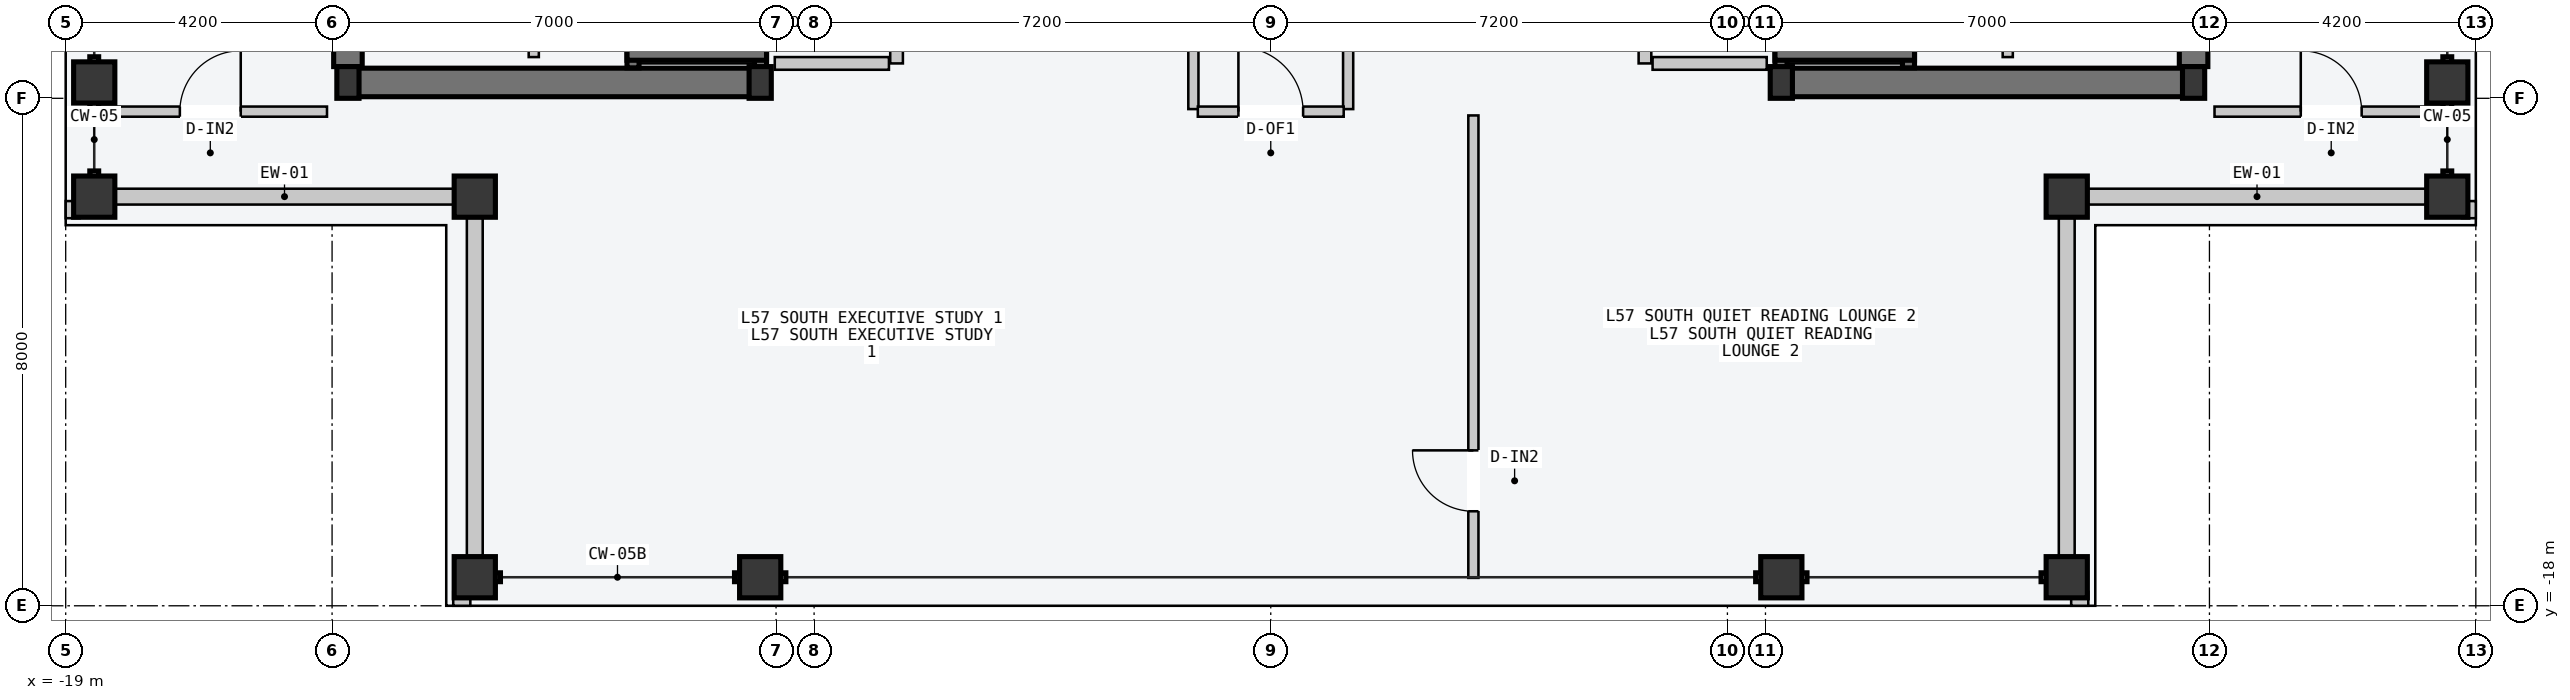
"""IFC4 building model, lengths in metres.
Left out: names, types, materials, properties, quantities, classifications, styles, units other than length and angle.
Written with IfcOpenShell. Run it as: python <this file> out.ifc"""

import sys

from ifc_helpers import new_model, si_unit, direction, frame, frame_2d, origin, origin_2d, place, context, subcontext, project, spatial, rectangle, hollow_rectangle, i_section, extrude, element, fill, save


model = new_model("IFC4")
c1 = context("Model", 3, precision=1e-05, world=origin(), true_north=direction((0.0, 1.0)))
c2 = subcontext(c1, "Body", "Model", "MODEL_VIEW")
j1 = project(units=[si_unit("LENGTHUNIT", "METRE"), si_unit("PLANEANGLEUNIT", "RADIAN")], contexts=[c1])
p1 = place(None, origin())
s1 = spatial("IfcSite", under=j1, at=p1, CompositionType="ELEMENT")
p2 = place(p1, origin())
s2 = spatial("IfcBuilding", under=s1, at=p2, CompositionType="ELEMENT")
p3 = place(p2, frame((0.0, 0.0, 218.4)))
s3 = spatial("IfcBuildingStorey", under=s2, at=p3, CompositionType="ELEMENT", Elevation=218.4)
p4 = place(p3, frame((-14.53, -9.75, -0.2), z_axis=(0.0, 0.0, 1.0), x_axis=(1.0, 0.0, 0.0)))
e1 = element("IfcWall", 1, at=p4, inside=s3, PredefinedType="SHEAR", context=c2, shape_type="SweptSolid", body=[
    extrude(rectangle(XDim=6.46, YDim=0.45, at=frame_2d((3.23, 0.0))), origin(), (0.0, 0.0, 1.0), 3.6),
])
p5 = place(p3, frame((-14.55, -9.5, -0.2), z_axis=(0.0, 0.0, 1.0), x_axis=(0.0, 1.0, 0.0)))
e2 = element("IfcWall", 2, at=p5, inside=s3, PredefinedType="SHEAR", context=c2, shape_type="SweptSolid", body=[
    extrude(rectangle(XDim=9.25, YDim=0.45, at=frame_2d((4.625, 0.0))), origin(), (0.0, 0.0, 1.0), 3.6),
])
p6 = place(p3, frame((8.07, -9.75, -0.2), z_axis=(0.0, 0.0, 1.0), x_axis=(1.0, 0.0, 0.0)))
e3 = element("IfcWall", 3, at=p6, inside=s3, PredefinedType="SHEAR", context=c2, shape_type="SweptSolid", body=[
    extrude(rectangle(XDim=6.46, YDim=0.45, at=frame_2d((3.23, 0.0))), origin(), (0.0, 0.0, 1.0), 3.6),
])
p7 = place(p3, frame((14.55, -9.5, -0.2), z_axis=(0.0, 0.0, 1.0), x_axis=(0.0, 1.0, 0.0)))
e4 = element("IfcWall", 4, at=p7, inside=s3, PredefinedType="SHEAR", context=c2, shape_type="SweptSolid", body=[
    extrude(rectangle(XDim=9.25, YDim=0.45, at=frame_2d((4.625, 0.0))), origin(), (0.0, 0.0, 1.0), 3.6),
])
for number, where, z_axis, x_axis in (
    (5, (-14.55, -9.75, 0.0), (0.0, 0.0, 1.0), (1.0, 0.0, 0.0)),
    (6, (-8.05, -9.75, 0.0), (0.0, 0.0, 1.0), (1.0, 0.0, 0.0)),
    (7, (8.05, -9.75, 0.0), (0.0, 0.0, 1.0), (1.0, 0.0, 0.0)),
    (8, (14.55, -9.75, 0.0), (0.0, 0.0, 1.0), (1.0, 0.0, 0.0)),
):
    element("IfcColumn", number, at=place(p3, frame(where, z_axis=z_axis, x_axis=x_axis)), inside=s3, PredefinedType="COLUMN", context=c2, shape_type="SweptSolid", body=[
        extrude(i_section(OverallWidth=0.35, OverallDepth=0.5, WebThickness=0.02, FlangeThickness=0.032, at=origin_2d()), origin(), (0.0, 0.0, 1.0), 3.6),
    ])
for number, where, z_axis, x_axis in (
    (9, (-12.55, -17.55, 0.0), (0.0, 0.0, 1.0), (1.0, 0.0, 0.0)),
    (10, (-8.05, -17.55, 0.0), (0.0, 0.0, 1.0), (1.0, 0.0, 0.0)),
    (11, (8.05, -17.55, 0.0), (0.0, 0.0, 1.0), (1.0, 0.0, 0.0)),
    (12, (12.55, -17.55, 0.0), (0.0, 0.0, 1.0), (1.0, 0.0, 0.0)),
    (13, (-18.55, -11.55, 0.0), (0.0, 0.0, 1.0), (0.0, 1.0, 0.0)),
    (14, (-18.55, -9.75, 0.0), (0.0, 0.0, 1.0), (0.0, 1.0, 0.0)),
    (15, (18.55, -11.55, 0.0), (0.0, 0.0, 1.0), (0.0, 1.0, 0.0)),
    (16, (18.55, -9.75, 0.0), (0.0, 0.0, 1.0), (0.0, 1.0, 0.0)),
    (17, (12.55, -11.55, 0.0), (0.0, 0.0, 1.0), (1.0, 0.0, 0.0)),
    (18, (-12.55, -11.55, 0.0), (0.0, 0.0, 1.0), (1.0, 0.0, 0.0)),
):
    element("IfcColumn", number, at=place(p3, frame(where, z_axis=z_axis, x_axis=x_axis)), inside=s3, PredefinedType="COLUMN", context=c2, shape_type="SweptSolid", body=[
        extrude(hollow_rectangle(XDim=0.65, YDim=0.65, WallThickness=0.028, at=origin_2d()), origin(), (0.0, 0.0, 1.0), 3.6),
    ])
for number, where, z_axis, x_axis in (
    (19, (-18.215, -11.55, 0.0), (0.0, 0.0, 1.0), (1.0, 0.0, 0.0)),
    (20, (-12.55, -17.215, 0.0), (0.0, 0.0, 1.0), (0.0, 1.0, 0.0)),
    (21, (12.885, -11.55, 0.0), (0.0, 0.0, 1.0), (1.0, 0.0, 0.0)),
    (22, (12.55, -17.215, 0.0), (0.0, 0.0, 1.0), (0.0, 1.0, 0.0)),
):
    element("IfcWall", number, at=place(p3, frame(where, z_axis=z_axis, x_axis=x_axis)), inside=s3, PredefinedType="STANDARD", context=c2, shape_type="SweptSolid", body=[
        extrude(rectangle(XDim=5.33, YDim=0.25, at=frame_2d((2.665, 0.0))), origin(), (0.0, 0.0, 1.0), 2.85),
    ])
for number, where, z_axis, x_axis in (
    (23, (-12.89, -17.89, 0.0), (0.0, 0.0, 1.0), (1.0, 0.0, 0.0)),
    (24, (-18.89, -11.89, 0.0), (0.0, 0.0, 1.0), (0.0, 1.0, 0.0)),
    (25, (12.62, -17.89, 0.0), (0.0, 0.0, 1.0), (1.0, 0.0, 0.0)),
    (26, (18.89, -11.89, 0.0), (0.0, 0.0, 1.0), (0.0, 1.0, 0.0)),
):
    element("IfcWall", number, at=place(p3, frame(where, z_axis=z_axis, x_axis=x_axis)), inside=s3, PredefinedType="PARAPET", context=c2, shape_type="SweptSolid", body=[
        extrude(rectangle(XDim=0.27, YDim=0.22, at=frame_2d((0.135, 0.0))), origin(), (0.0, 0.0, 1.0), 1.2),
    ])
p8 = place(p3, frame((-8.045, -9.52, -0.2), z_axis=(0.0, 0.0, 1.0), x_axis=(0.0, 1.0, 0.0)))
e27 = element("IfcWall", 27, at=p8, inside=s3, PredefinedType="SOLIDWALL", context=c2, shape_type="SweptSolid", body=[
    extrude(rectangle(XDim=2.12, YDim=0.19, at=frame_2d((1.06, 0.0))), origin(), (0.0, 0.0, 1.0), 3.6),
])
p9 = place(p8, frame((0.57, 0.0, 0.2)))
e28 = element("IfcOpeningElement", 28, at=p9, cuts=e27, PredefinedType="OPENING", context=c2, shape_type="SweptSolid", body=[
    extrude(rectangle(XDim=1.1, YDim=2.2, at=frame_2d((0.55, 1.1))), frame((0.0, 0.105, 0.0), z_axis=(0.0, -1.0, 0.0), x_axis=(1.0, 0.0, 0.0)), (0.0, 0.0, 1.0), 0.21),
])
p10 = place(p3, frame((-10.055, -9.52, -0.2), z_axis=(0.0, 0.0, 1.0), x_axis=(0.0, 1.0, 0.0)))
e29 = element("IfcWall", 29, at=p10, inside=s3, PredefinedType="SOLIDWALL", context=c2, shape_type="SweptSolid", body=[
    extrude(rectangle(XDim=2.12, YDim=0.19, at=frame_2d((1.06, 0.0))), origin(), (0.0, 0.0, 1.0), 3.6),
])
p11 = place(p3, frame((-10.15, -9.305, -0.2), z_axis=(0.0, 0.0, 1.0), x_axis=(1.0, 0.0, 0.0)))
e30 = element("IfcWall", 30, at=p11, inside=s3, PredefinedType="SOLIDWALL", context=c2, shape_type="SweptSolid", body=[
    extrude(rectangle(XDim=2.2, YDim=0.19, at=frame_2d((1.1, 0.0))), origin(), (0.0, 0.0, 1.0), 3.6),
])
p12 = place(p3, frame((8.045, -9.52, -0.2), z_axis=(0.0, 0.0, 1.0), x_axis=(0.0, 1.0, 0.0)))
e31 = element("IfcWall", 31, at=p12, inside=s3, PredefinedType="SOLIDWALL", context=c2, shape_type="SweptSolid", body=[
    extrude(rectangle(XDim=2.12, YDim=0.19, at=frame_2d((1.06, 0.0))), origin(), (0.0, 0.0, 1.0), 3.6),
])
p13 = place(p12, frame((0.57, 0.0, 0.2)))
e32 = element("IfcOpeningElement", 32, at=p13, cuts=e31, PredefinedType="OPENING", context=c2, shape_type="SweptSolid", body=[
    extrude(rectangle(XDim=1.1, YDim=2.2, at=frame_2d((0.55, 1.1))), frame((0.0, 0.105, 0.0), z_axis=(0.0, -1.0, 0.0), x_axis=(1.0, 0.0, 0.0)), (0.0, 0.0, 1.0), 0.21),
])
p14 = place(p3, frame((10.055, -9.52, -0.2), z_axis=(0.0, 0.0, 1.0), x_axis=(0.0, 1.0, 0.0)))
e33 = element("IfcWall", 33, at=p14, inside=s3, PredefinedType="SOLIDWALL", context=c2, shape_type="SweptSolid", body=[
    extrude(rectangle(XDim=2.12, YDim=0.19, at=frame_2d((1.06, 0.0))), origin(), (0.0, 0.0, 1.0), 3.6),
])
p15 = place(p3, frame((7.95, -9.305, -0.2), z_axis=(0.0, 0.0, 1.0), x_axis=(1.0, 0.0, 0.0)))
e34 = element("IfcWall", 34, at=p15, inside=s3, PredefinedType="SOLIDWALL", context=c2, shape_type="SweptSolid", body=[
    extrude(rectangle(XDim=2.2, YDim=0.19, at=frame_2d((1.1, 0.0))), origin(), (0.0, 0.0, 1.0), 3.6),
])
p16 = place(p3, frame((-5.9, -9.45, 0.0), z_axis=(0.0, 0.0, 1.0), x_axis=(0.0, 1.0, 0.0)))
e35 = element("IfcWall", 35, at=p16, inside=s3, PredefinedType="PARTITIONING", context=c2, shape_type="SweptSolid", body=[
    extrude(rectangle(XDim=10.5, YDim=0.2, at=frame_2d((5.25, 0.0))), origin(), (0.0, 0.0, 1.0), 3.4),
])
p17 = place(p16, frame((3.9, 0.0, 0.0)))
e36 = element("IfcOpeningElement", 36, at=p17, cuts=e35, PredefinedType="OPENING", context=c2, shape_type="SweptSolid", body=[
    extrude(rectangle(XDim=1.5, YDim=2.2, at=frame_2d((0.75, 1.1))), frame((0.0, 0.11, 0.0), z_axis=(0.0, -1.0, 0.0), x_axis=(1.0, 0.0, 0.0)), (0.0, 0.0, 1.0), 0.22),
])
p18 = place(p3, frame((-6.02, -9.45, 0.0), z_axis=(0.0, 0.0, 1.0), x_axis=(-1.0, 0.0, 0.0)))
e37 = element("IfcWall", 37, at=p18, inside=s3, PredefinedType="PARTITIONING", context=c2, shape_type="SweptSolid", body=[
    extrude(rectangle(XDim=1.8, YDim=0.2, at=frame_2d((0.9, 0.0))), origin(), (0.0, 0.0, 1.0), 3.4),
])
p19 = place(p3, frame((-11.62, -9.35, 0.0), z_axis=(0.0, 0.0, 1.0), x_axis=(0.0, 1.0, 0.0)))
e38 = element("IfcWall", 38, at=p19, inside=s3, PredefinedType="PARTITIONING", context=c2, shape_type="SweptSolid", body=[
    extrude(rectangle(XDim=3.85, YDim=0.16, at=frame_2d((1.925, 0.0))), origin(), (0.0, 0.0, 1.0), 3.4),
])
p20 = place(p19, frame((1.475, 0.0, 0.0)))
e39 = element("IfcOpeningElement", 39, at=p20, cuts=e38, PredefinedType="OPENING", context=c2, shape_type="SweptSolid", body=[
    extrude(rectangle(XDim=0.9, YDim=2.15, at=frame_2d((0.45, 1.075))), frame((0.0, 0.09, 0.0), z_axis=(0.0, -1.0, 0.0), x_axis=(1.0, 0.0, 0.0)), (0.0, 0.0, 1.0), 0.18),
])
p21 = place(p3, frame((5.9, -9.45, 0.0), z_axis=(0.0, 0.0, 1.0), x_axis=(0.0, 1.0, 0.0)))
e40 = element("IfcWall", 40, at=p21, inside=s3, PredefinedType="PARTITIONING", context=c2, shape_type="SweptSolid", body=[
    extrude(rectangle(XDim=10.5, YDim=0.2, at=frame_2d((5.25, 0.0))), origin(), (0.0, 0.0, 1.0), 3.4),
])
p22 = place(p21, frame((3.9, 0.0, 0.0)))
e41 = element("IfcOpeningElement", 41, at=p22, cuts=e40, PredefinedType="OPENING", context=c2, shape_type="SweptSolid", body=[
    extrude(rectangle(XDim=1.5, YDim=2.2, at=frame_2d((0.75, 1.1))), frame((0.0, 0.11, 0.0), z_axis=(0.0, -1.0, 0.0), x_axis=(1.0, 0.0, 0.0)), (0.0, 0.0, 1.0), 0.22),
])
p23 = place(p3, frame((6.02, -9.45, 0.0), z_axis=(0.0, 0.0, 1.0), x_axis=(1.0, 0.0, 0.0)))
e42 = element("IfcWall", 42, at=p23, inside=s3, PredefinedType="PARTITIONING", context=c2, shape_type="SweptSolid", body=[
    extrude(rectangle(XDim=1.8, YDim=0.2, at=frame_2d((0.9, 0.0))), origin(), (0.0, 0.0, 1.0), 3.4),
])
p24 = place(p3, frame((11.62, -9.35, 0.0), z_axis=(0.0, 0.0, 1.0), x_axis=(0.0, 1.0, 0.0)))
e43 = element("IfcWall", 43, at=p24, inside=s3, PredefinedType="PARTITIONING", context=c2, shape_type="SweptSolid", body=[
    extrude(rectangle(XDim=3.85, YDim=0.16, at=frame_2d((1.925, 0.0))), origin(), (0.0, 0.0, 1.0), 3.4),
])
p25 = place(p24, frame((1.475, 0.0, 0.0)))
e44 = element("IfcOpeningElement", 44, at=p25, cuts=e43, PredefinedType="OPENING", context=c2, shape_type="SweptSolid", body=[
    extrude(rectangle(XDim=0.9, YDim=2.15, at=frame_2d((0.45, 1.075))), frame((0.0, 0.09, 0.0), z_axis=(0.0, -1.0, 0.0), x_axis=(1.0, 0.0, 0.0)), (0.0, 0.0, 1.0), 0.18),
])
p26 = place(p3, frame((-1.22, -10.17, 0.0), z_axis=(0.0, 0.0, 1.0), x_axis=(0.0, 1.0, 0.0)))
e45 = element("IfcWall", 45, at=p26, inside=s3, PredefinedType="PARTITIONING", context=c2, shape_type="SweptSolid", body=[
    extrude(rectangle(XDim=4.49, YDim=0.16, at=frame_2d((2.245, 0.0))), origin(), (0.0, 0.0, 1.0), 3.4),
])
p27 = place(p26, frame((1.15, 0.0, 0.0)))
e46 = element("IfcOpeningElement", 46, at=p27, cuts=e45, PredefinedType="OPENING", context=c2, shape_type="SweptSolid", body=[
    extrude(rectangle(XDim=0.96, YDim=2.18, at=frame_2d((0.48, 1.09))), frame((0.0, 0.09, 0.0), z_axis=(0.0, -1.0, 0.0), x_axis=(1.0, 0.0, 0.0)), (0.0, 0.0, 1.0), 0.18),
])
p28 = place(p3, frame((1.22, -10.17, 0.0), z_axis=(0.0, 0.0, 1.0), x_axis=(0.0, 1.0, 0.0)))
e47 = element("IfcWall", 47, at=p28, inside=s3, PredefinedType="PARTITIONING", context=c2, shape_type="SweptSolid", body=[
    extrude(rectangle(XDim=4.49, YDim=0.16, at=frame_2d((2.245, 0.0))), origin(), (0.0, 0.0, 1.0), 3.4),
])
p29 = place(p28, frame((1.15, 0.0, 0.0)))
e48 = element("IfcOpeningElement", 48, at=p29, cuts=e47, PredefinedType="OPENING", context=c2, shape_type="SweptSolid", body=[
    extrude(rectangle(XDim=0.96, YDim=2.18, at=frame_2d((0.48, 1.09))), frame((0.0, 0.09, 0.0), z_axis=(0.0, -1.0, 0.0), x_axis=(1.0, 0.0, 0.0)), (0.0, 0.0, 1.0), 0.18),
])
p30 = place(p3, frame((3.195, -17.56, 0.0), z_axis=(0.0, 0.0, 1.0), x_axis=(0.0, 1.0, 0.0)))
e49 = element("IfcWall", 49, at=p30, inside=s3, PredefinedType="PARTITIONING", context=c2, shape_type="SweptSolid", body=[
    extrude(rectangle(XDim=7.29, YDim=0.16, at=frame_2d((3.645, 0.0))), origin(), (0.0, 0.0, 1.0), 3.4),
])
p31 = place(p30, frame((1.05, 0.0, 0.0)))
e50 = element("IfcOpeningElement", 50, at=p31, cuts=e49, PredefinedType="OPENING", context=c2, shape_type="SweptSolid", body=[
    extrude(rectangle(XDim=0.96, YDim=2.18, at=frame_2d((0.48, 1.09))), frame((0.0, 0.09, 0.0), z_axis=(0.0, -1.0, 0.0), x_axis=(1.0, 0.0, 0.0)), (0.0, 0.0, 1.0), 0.18),
])
p32 = place(p3, frame((-1.15, -10.21, 0.0), z_axis=(0.0, 0.0, 1.0), x_axis=(1.0, 0.0, 0.0)))
e51 = element("IfcWall", 51, at=p32, inside=s3, PredefinedType="PARTITIONING", context=c2, shape_type="SweptSolid", body=[
    extrude(rectangle(XDim=2.3, YDim=0.16, at=frame_2d((1.15, 0.0))), origin(), (0.0, 0.0, 1.0), 3.4),
])
p33 = place(p32, frame((0.64, 0.0, 0.0)))
e52 = element("IfcOpeningElement", 52, at=p33, cuts=e51, PredefinedType="OPENING", context=c2, shape_type="SweptSolid", body=[
    extrude(rectangle(XDim=1.02, YDim=2.2, at=frame_2d((0.51, 1.1))), frame((0.0, 0.09, 0.0), z_axis=(0.0, -1.0, 0.0), x_axis=(1.0, 0.0, 0.0)), (0.0, 0.0, 1.0), 0.18),
])
p34 = place(p3, frame((-18.56, -10.21, 0.0), z_axis=(0.0, 0.0, 1.0), x_axis=(1.0, 0.0, 0.0)))
e53 = element("IfcWall", 53, at=p34, inside=s3, PredefinedType="PARTITIONING", context=c2, shape_type="SweptSolid", body=[
    extrude(rectangle(XDim=3.68, YDim=0.16, at=frame_2d((1.84, 0.0))), origin(), (0.0, 0.0, 1.0), 3.4),
])
p35 = place(p34, frame((1.36, 0.0, 0.0)))
e54 = element("IfcOpeningElement", 54, at=p35, cuts=e53, PredefinedType="OPENING", context=c2, shape_type="SweptSolid", body=[
    extrude(rectangle(XDim=0.96, YDim=2.18, at=frame_2d((0.48, 1.09))), frame((0.0, 0.09, 0.0), z_axis=(0.0, -1.0, 0.0), x_axis=(1.0, 0.0, 0.0)), (0.0, 0.0, 1.0), 0.18),
])
p36 = place(p3, frame((14.88, -10.21, 0.0), z_axis=(0.0, 0.0, 1.0), x_axis=(1.0, 0.0, 0.0)))
e55 = element("IfcWall", 55, at=p36, inside=s3, PredefinedType="PARTITIONING", context=c2, shape_type="SweptSolid", body=[
    extrude(rectangle(XDim=3.68, YDim=0.16, at=frame_2d((1.84, 0.0))), origin(), (0.0, 0.0, 1.0), 3.4),
])
p37 = place(p36, frame((1.36, 0.0, 0.0)))
e56 = element("IfcOpeningElement", 56, at=p37, cuts=e55, PredefinedType="OPENING", context=c2, shape_type="SweptSolid", body=[
    extrude(rectangle(XDim=0.96, YDim=2.18, at=frame_2d((0.48, 1.09))), frame((0.0, 0.09, 0.0), z_axis=(0.0, -1.0, 0.0), x_axis=(1.0, 0.0, 0.0)), (0.0, 0.0, 1.0), 0.18),
])
p38 = place(p31, origin())
e57 = element("IfcDoor", 57, at=p38, inside=s3, OperationType="SINGLE_SWING_RIGHT", PredefinedType="DOOR", context=c2, shape_type="SweptSolid", body=[
    extrude(rectangle(XDim=0.96, YDim=2.18, at=frame_2d((0.48, 1.09))), frame((0.0, 0.025, 0.0), z_axis=(0.0, -1.0, 0.0), x_axis=(1.0, 0.0, 0.0)), (0.0, 0.0, 1.0), 0.05),
])
fill(e50, e57)
p39 = place(p33, origin())
e58 = element("IfcDoor", 58, at=p39, inside=s3, OperationType="SINGLE_SWING_LEFT", PredefinedType="DOOR", context=c2, shape_type="SweptSolid", body=[
    extrude(rectangle(XDim=1.02, YDim=2.2, at=frame_2d((0.51, 1.1))), frame((0.0, 0.025, 0.0), z_axis=(0.0, -1.0, 0.0), x_axis=(1.0, 0.0, 0.0)), (0.0, 0.0, 1.0), 0.05),
])
fill(e52, e58)
p40 = place(p35, origin())
e59 = element("IfcDoor", 59, at=p40, inside=s3, OperationType="SINGLE_SWING_RIGHT", PredefinedType="DOOR", context=c2, shape_type="SweptSolid", body=[
    extrude(rectangle(XDim=0.96, YDim=2.18, at=frame_2d((0.48, 1.09))), frame((0.0, 0.025, 0.0), z_axis=(0.0, -1.0, 0.0), x_axis=(1.0, 0.0, 0.0)), (0.0, 0.0, 1.0), 0.05),
])
fill(e54, e59)
p41 = place(p37, origin())
e60 = element("IfcDoor", 60, at=p41, inside=s3, OperationType="SINGLE_SWING_LEFT", PredefinedType="DOOR", context=c2, shape_type="SweptSolid", body=[
    extrude(rectangle(XDim=0.96, YDim=2.18, at=frame_2d((0.48, 1.09))), frame((0.0, 0.025, 0.0), z_axis=(0.0, -1.0, 0.0), x_axis=(1.0, 0.0, 0.0)), (0.0, 0.0, 1.0), 0.05),
])
fill(e56, e60)
save(model, sys.argv[1])
